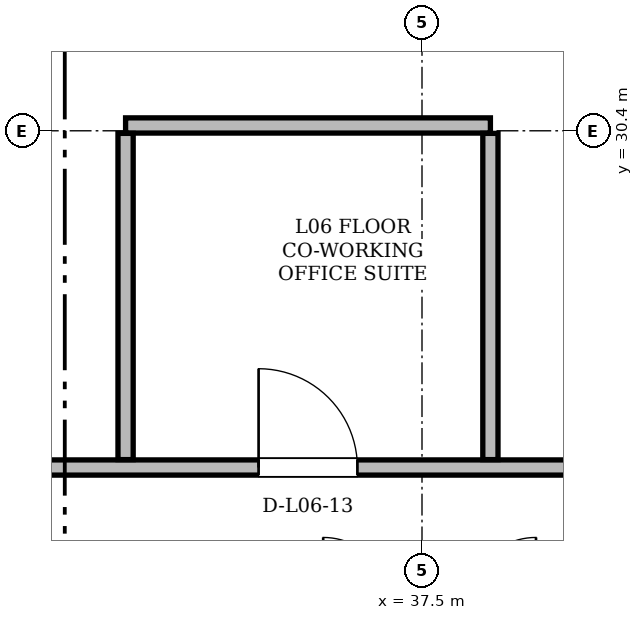
"""IFC4 building model, lengths in metres.
Left out: names, types, materials, properties, quantities, classifications, styles, units other than length and angle.
Written with IfcOpenShell. Run it as: python <this file> out.ifc"""

import sys

from ifc_helpers import new_model, si_unit, direction, frame, frame_2d, origin, place, context, subcontext, project, spatial, rectangle, extrude, element, fill, save


model = new_model("IFC4")
c1 = context("Model", 3, precision=1e-05, world=origin(), true_north=direction((0.0, 1.0)))
c2 = subcontext(c1, "Body", "Model", "MODEL_VIEW")
j1 = project(units=[si_unit("LENGTHUNIT", "METRE"), si_unit("PLANEANGLEUNIT", "RADIAN")], contexts=[c1])
p1 = place(None, origin())
s1 = spatial("IfcSite", under=j1, at=p1, CompositionType="ELEMENT")
p2 = place(p1, origin())
s2 = spatial("IfcBuilding", under=s1, at=p2, CompositionType="ELEMENT")
p3 = place(p2, frame((0.0, 0.0, 27.3)))
s3 = spatial("IfcBuildingStorey", under=s2, at=p3, CompositionType="ELEMENT", Elevation=27.3)
p4 = place(p3, frame((27.55, 25.97, 0.0), z_axis=(0.0, 0.0, 1.0), x_axis=(1.0, 0.0, 0.0)))
e1 = element("IfcWall", 1, at=p4, inside=s3, PredefinedType="PARTITIONING", context=c2, shape_type="SweptSolid", body=[
    extrude(rectangle(XDim=19.9, YDim=0.2, at=frame_2d((9.95, 0.0))), origin(), (0.0, 0.0, 1.0), 2.738),
])
p5 = place(p4, frame((2.619, 0.0, 0.0)))
e2 = element("IfcOpeningElement", 2, at=p5, cuts=e1, PredefinedType="OPENING", context=c2, shape_type="SweptSolid", body=[
    extrude(rectangle(XDim=1.0, YDim=2.18, at=frame_2d((0.5, 1.09))), frame((0.0, 0.1, 0.0), z_axis=(0.0, -1.0, 0.0), x_axis=(1.0, 0.0, 0.0)), (0.0, 0.0, 1.0), 0.2),
])
p6 = place(p4, frame((7.8, 0.0, 0.0)))
e3 = element("IfcOpeningElement", 3, at=p6, cuts=e1, PredefinedType="OPENING", context=c2, shape_type="SweptSolid", body=[
    extrude(rectangle(XDim=1.3, YDim=2.2, at=frame_2d((0.65, 1.1))), frame((0.0, 0.1, 0.0), z_axis=(0.0, -1.0, 0.0), x_axis=(1.0, 0.0, 0.0)), (0.0, 0.0, 1.0), 0.2),
])
p7 = place(p4, frame((16.862, 0.0, 0.0)))
e4 = element("IfcOpeningElement", 4, at=p7, cuts=e1, PredefinedType="OPENING", context=c2, shape_type="SweptSolid", body=[
    extrude(rectangle(XDim=1.0, YDim=2.18, at=frame_2d((0.5, 1.09))), frame((0.0, 0.1, 0.0), z_axis=(0.0, -1.0, 0.0), x_axis=(1.0, 0.0, 0.0)), (0.0, 0.0, 1.0), 0.2),
])
p8 = place(p3, frame((33.6, 30.47, 0.0), z_axis=(0.0, 0.0, 1.0), x_axis=(1.0, 0.0, 0.0)))
e5 = element("IfcWall", 5, at=p8, inside=s3, PredefinedType="PARTITIONING", context=c2, shape_type="SweptSolid", body=[
    extrude(rectangle(XDim=4.8, YDim=0.2, at=frame_2d((2.4, 0.0))), origin(), (0.0, 0.0, 1.0), 3.36),
])
for number, where, z_axis, x_axis in (
    (6, (33.6, 26.074, 0.0), (0.0, 0.0, 1.0), (0.0, 1.0, 0.0)),
    (7, (38.4, 26.074, 0.0), (0.0, 0.0, 1.0), (0.0, 1.0, 0.0)),
):
    element("IfcWall", number, at=place(p3, frame(where, z_axis=z_axis, x_axis=x_axis)), inside=s3, PredefinedType="PARTITIONING", context=c2, shape_type="SweptSolid", body=[
        extrude(rectangle(XDim=4.292, YDim=0.2, at=frame_2d((2.146, 0.0))), origin(), (0.0, 0.0, 1.0), 3.36),
    ])
p9 = place(p6, origin())
e8 = element("IfcDoor", 8, at=p9, inside=s3, OperationType="SINGLE_SWING_LEFT", PredefinedType="DOOR", context=c2, shape_type="SweptSolid", body=[
    extrude(rectangle(XDim=1.3, YDim=2.2, at=frame_2d((0.65, 1.1))), frame((0.0, 0.025, 0.0), z_axis=(0.0, -1.0, 0.0), x_axis=(1.0, 0.0, 0.0)), (0.0, 0.0, 1.0), 0.05),
])
fill(e3, e8)
save(model, sys.argv[1])
